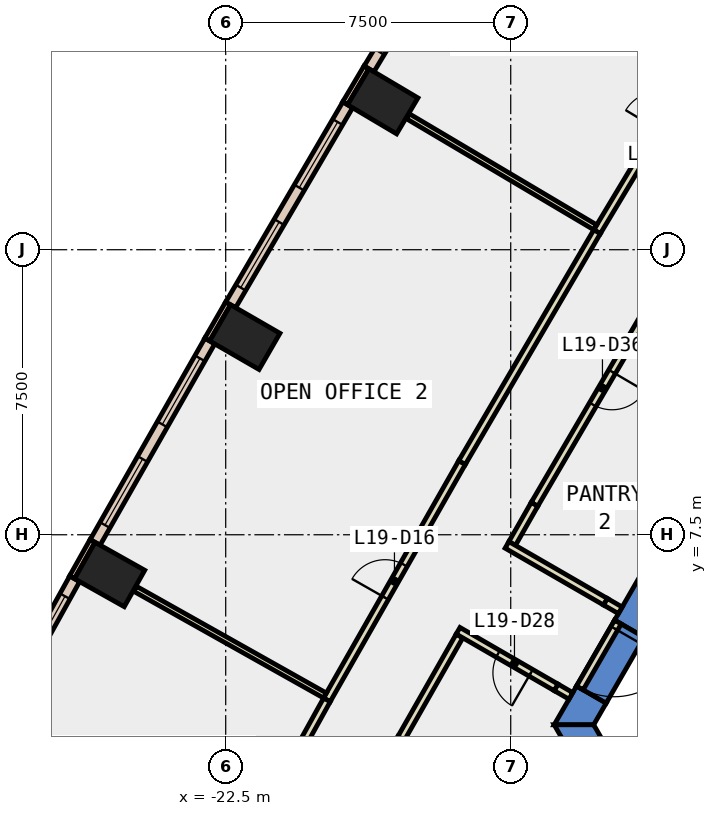
"""IFC4 building model, lengths in metres.
Left out: names, types, materials, properties, quantities, classifications, styles, units other than length and angle.
Written with IfcOpenShell. Run it as: python <this file> out.ifc"""

import sys

from ifc_helpers import new_model, si_unit, direction, frame, frame_2d, origin, origin_2d, place, context, subcontext, project, spatial, polyline, rectangle, outline, extrude, element, fill, save


model = new_model("IFC4")
c1 = context("Model", 3, precision=1e-05, world=origin(), true_north=direction((0.0, 1.0)))
c2 = subcontext(c1, "Body", "Model", "MODEL_VIEW")
j1 = project(units=[si_unit("LENGTHUNIT", "METRE"), si_unit("PLANEANGLEUNIT", "RADIAN")], contexts=[c1])
p1 = place(None, origin())
s1 = spatial("IfcSite", under=j1, at=p1, CompositionType="ELEMENT")
p2 = place(p1, origin())
s2 = spatial("IfcBuilding", under=s1, at=p2, CompositionType="ELEMENT")
p3 = place(p2, frame((0.0, 0.0, 90.8)))
s3 = spatial("IfcBuildingStorey", under=s2, at=p3, CompositionType="ELEMENT", Elevation=90.8)
for number, where, z_axis, x_axis in (
    (1, (-18.367, 18.904, -0.4), (0.0, 0.0, 1.0), (0.51, 0.86, 0.0)),
    (2, (-21.997, 12.7, -0.4), (0.0, 0.0, 1.0), (0.5, 0.866, 0.0)),
    (3, (-25.554, 6.454, -0.4), (0.0, 0.0, 1.0), (0.49, 0.872, 0.0)),
):
    element("IfcColumn", number, at=place(p3, frame(where, z_axis=z_axis, x_axis=x_axis)), inside=s3, PredefinedType="COLUMN", context=c2, shape_type="SweptSolid", body=[
        extrude(rectangle(XDim=1.1, YDim=1.5, at=origin_2d()), origin(), (0.0, 0.0, 1.0), 4.2),
    ])
p4 = place(p3, frame((0.0, 0.0, -0.4)))
e4 = element("IfcWall", 4, at=p4, inside=s3, PredefinedType="SHEAR", context=c2, shape_type="SweptSolid", body=[
    extrude(outline(polyline([(-12.267, 5.252), (-11.488, 4.802), (-6.409, 13.6), (-6.928, 14.5), (-12.267, 5.252)])), origin(), (0.0, 0.0, 1.0), 4.2),
])
p5 = place(p3, frame((0.0, 0.0, -0.4)))
e5 = element("IfcWall", 5, at=p5, inside=s3, PredefinedType="SHEAR", context=c2, shape_type="SweptSolid", body=[
    extrude(outline(polyline([(-12.488, 3.07), (-13.267, 3.52), (-13.856, 2.5), (-12.817, 2.5), (-12.488, 3.07)])), origin(), (0.0, 0.0, 1.0), 4.2),
])
p6 = place(p3, frame((0.0, 0.0, 3.6)))
e6 = element("IfcWall", 6, at=p6, inside=s3, PredefinedType="SHEAR", context=c2, shape_type="SweptSolid", body=[
    extrude(outline(polyline([(-13.267, 3.52), (-12.488, 3.07), (-11.488, 4.802), (-12.267, 5.252), (-13.267, 3.52)])), origin(), (0.0, 0.0, 1.0), 0.2),
])
p7 = place(p3, frame((0.0, 0.0, -0.4)))
e7 = element("IfcWall", 7, at=p7, inside=s3, PredefinedType="SHEAR", context=c2, shape_type="SweptSolid", body=[
    extrude(outline(polyline([(-13.856, 2.5), (-6.928, -9.5), (-6.409, -8.6), (-12.817, 2.5), (-13.856, 2.5)])), origin(), (0.0, 0.0, 1.0), 4.2),
])
p8 = place(p3, frame((-18.796, 19.798, 0.0), z_axis=(0.0, 0.0, 1.0), x_axis=(-0.510082245696, -0.860125631885, 0.0)))
e8 = element("IfcWall", 8, at=p8, inside=s3, PredefinedType="STANDARD", context=c2, shape_type="SweptSolid", body=[
    extrude(rectangle(XDim=1.1, YDim=0.15, at=frame_2d((0.55, 0.0))), origin(), (0.0, 0.0, 1.0), 3.8),
])
p9 = place(p3, frame((-22.436, 13.589, 0.0), z_axis=(0.0, 0.0, 1.0), x_axis=(-0.499837685251, -0.86611909597, 0.0)))
e9 = element("IfcWall", 9, at=p9, inside=s3, PredefinedType="STANDARD", context=c2, shape_type="SweptSolid", body=[
    extrude(rectangle(XDim=1.1, YDim=0.15, at=frame_2d((0.55, 0.0))), origin(), (0.0, 0.0, 1.0), 3.8),
])
p10 = place(p3, frame((-26.004, 7.338, 0.0), z_axis=(0.0, 0.0, 1.0), x_axis=(-0.490008344094, -0.871717742574, 0.0)))
e10 = element("IfcWall", 10, at=p10, inside=s3, PredefinedType="STANDARD", context=c2, shape_type="SweptSolid", body=[
    extrude(rectangle(XDim=1.1, YDim=0.15, at=frame_2d((0.55, 0.0))), origin(), (0.0, 0.0, 1.0), 3.8),
])
p11 = place(p3, frame((-15.588, 24.984, 0.0), z_axis=(0.0, 0.0, 1.0), x_axis=(-0.515102053092, -0.857128855483, 0.0)))
e11 = element("IfcWall", 11, at=p11, inside=s3, PredefinedType="STANDARD", context=c2, shape_type="SweptSolid", body=[
    extrude(rectangle(XDim=6.098, YDim=0.3, at=frame_2d((3.049, 0.0))), origin(), (0.0, 0.0, 1.0), 3.8),
])
p12 = place(p11, frame((0.525, 0.0, 0.9)))
e12 = element("IfcOpeningElement", 12, at=p12, cuts=e11, PredefinedType="OPENING", context=c2, shape_type="SweptSolid", body=[
    extrude(rectangle(XDim=2.0, YDim=2.6, at=frame_2d((1.0, 1.3))), frame((0.0, 0.16, 0.0), z_axis=(0.0, -1.0, 0.0), x_axis=(1.0, 0.0, 0.0)), (0.0, 0.0, 1.0), 0.32),
])
p13 = place(p11, frame((3.574, 0.0, 0.9)))
e13 = element("IfcOpeningElement", 13, at=p13, cuts=e11, PredefinedType="OPENING", context=c2, shape_type="SweptSolid", body=[
    extrude(rectangle(XDim=2.0, YDim=2.6, at=frame_2d((1.0, 1.3))), frame((0.0, 0.16, 0.0), z_axis=(0.0, -1.0, 0.0), x_axis=(1.0, 0.0, 0.0)), (0.0, 0.0, 1.0), 0.32),
])
p14 = place(p3, frame((-19.289, 18.813, 0.0), z_axis=(0.0, 0.0, 1.0), x_axis=(-0.504998117261, -0.863120444413, 0.0)))
e14 = element("IfcWall", 14, at=p14, inside=s3, PredefinedType="STANDARD", context=c2, shape_type="SweptSolid", body=[
    extrude(rectangle(XDim=6.099, YDim=0.3, at=frame_2d((3.049, 0.0))), origin(), (0.0, 0.0, 1.0), 3.8),
])
p15 = place(p14, frame((0.525, 0.0, 0.9)))
e15 = element("IfcOpeningElement", 15, at=p15, cuts=e14, PredefinedType="OPENING", context=c2, shape_type="SweptSolid", body=[
    extrude(rectangle(XDim=2.0, YDim=2.6, at=frame_2d((1.0, 1.3))), frame((0.0, 0.16, 0.0), z_axis=(0.0, -1.0, 0.0), x_axis=(1.0, 0.0, 0.0)), (0.0, 0.0, 1.0), 0.32),
])
p16 = place(p14, frame((3.574, 0.0, 0.9)))
e16 = element("IfcOpeningElement", 16, at=p16, cuts=e14, PredefinedType="OPENING", context=c2, shape_type="SweptSolid", body=[
    extrude(rectangle(XDim=2.0, YDim=2.6, at=frame_2d((1.0, 1.3))), frame((0.0, 0.16, 0.0), z_axis=(0.0, -1.0, 0.0), x_axis=(1.0, 0.0, 0.0)), (0.0, 0.0, 1.0), 0.32),
])
p17 = place(p3, frame((-22.918, 12.598, 0.0), z_axis=(0.0, 0.0, 1.0), x_axis=(-0.49492259535, -0.868937065967, 0.0)))
e17 = element("IfcWall", 17, at=p17, inside=s3, PredefinedType="STANDARD", context=c2, shape_type="SweptSolid", body=[
    extrude(rectangle(XDim=6.098, YDim=0.3, at=frame_2d((3.049, 0.0))), origin(), (0.0, 0.0, 1.0), 3.8),
])
p18 = place(p17, frame((0.525, 0.0, 0.9)))
e18 = element("IfcOpeningElement", 18, at=p18, cuts=e17, PredefinedType="OPENING", context=c2, shape_type="SweptSolid", body=[
    extrude(rectangle(XDim=2.0, YDim=2.6, at=frame_2d((1.0, 1.3))), frame((0.0, 0.16, 0.0), z_axis=(0.0, -1.0, 0.0), x_axis=(1.0, 0.0, 0.0)), (0.0, 0.0, 1.0), 0.32),
])
p19 = place(p17, frame((3.574, 0.0, 0.9)))
e19 = element("IfcOpeningElement", 19, at=p19, cuts=e17, PredefinedType="OPENING", context=c2, shape_type="SweptSolid", body=[
    extrude(rectangle(XDim=2.0, YDim=2.6, at=frame_2d((1.0, 1.3))), frame((0.0, 0.16, 0.0), z_axis=(0.0, -1.0, 0.0), x_axis=(1.0, 0.0, 0.0)), (0.0, 0.0, 1.0), 0.32),
])
p20 = place(p3, frame((-26.474, 6.341, 0.0), z_axis=(0.0, 0.0, 1.0), x_axis=(-0.484823579315, -0.874611969356, 0.0)))
e20 = element("IfcWall", 20, at=p20, inside=s3, PredefinedType="STANDARD", context=c2, shape_type="SweptSolid", body=[
    extrude(rectangle(XDim=6.099, YDim=0.3, at=frame_2d((3.049, 0.0))), origin(), (0.0, 0.0, 1.0), 3.8),
])
p21 = place(p20, frame((0.525, 0.0, 0.9)))
e21 = element("IfcOpeningElement", 21, at=p21, cuts=e20, PredefinedType="OPENING", context=c2, shape_type="SweptSolid", body=[
    extrude(rectangle(XDim=2.0, YDim=2.6, at=frame_2d((1.0, 1.3))), frame((0.0, 0.16, 0.0), z_axis=(0.0, -1.0, 0.0), x_axis=(1.0, 0.0, 0.0)), (0.0, 0.0, 1.0), 0.32),
])
p22 = place(p20, frame((3.574, 0.0, 0.9)))
e22 = element("IfcOpeningElement", 22, at=p22, cuts=e20, PredefinedType="OPENING", context=c2, shape_type="SweptSolid", body=[
    extrude(rectangle(XDim=2.0, YDim=2.6, at=frame_2d((1.0, 1.3))), frame((0.0, 0.16, 0.0), z_axis=(0.0, -1.0, 0.0), x_axis=(1.0, 0.0, 0.0)), (0.0, 0.0, 1.0), 0.32),
])
p23 = place(p3, frame((-10.797, 14.415, 0.0), z_axis=(0.0, 0.0, 1.0), x_axis=(-0.505008297342, -0.863114488128, 0.0)))
e23 = element("IfcWall", 23, at=p23, inside=s3, PredefinedType="PARTITIONING", context=c2, shape_type="SweptSolid", body=[
    extrude(rectangle(XDim=7.085, YDim=0.2, at=frame_2d((3.542, 0.0))), origin(), (0.0, 0.0, 1.0), 3.8),
])
p24 = place(p23, frame((3.043, 0.0, 0.0)))
e24 = element("IfcOpeningElement", 24, at=p24, cuts=e23, PredefinedType="OPENING", context=c2, shape_type="SweptSolid", body=[
    extrude(rectangle(XDim=1.0, YDim=2.1, at=frame_2d((0.5, 1.05))), frame((0.0, 0.11, 0.0), z_axis=(0.0, -1.0, 0.0), x_axis=(1.0, 0.0, 0.0)), (0.0, 0.0, 1.0), 0.22),
])
p25 = place(p3, frame((-14.375, 8.3, 0.0), z_axis=(0.0, 0.0, 1.0), x_axis=(-0.495074026382, -0.868850797549, 0.0)))
e25 = element("IfcWall", 25, at=p25, inside=s3, PredefinedType="PARTITIONING", context=c2, shape_type="SweptSolid", body=[
    extrude(rectangle(XDim=1.186, YDim=0.2, at=frame_2d((0.593, 0.0))), origin(), (0.0, 0.0, 1.0), 3.8),
])
p26 = place(p3, frame((-15.098, 7.233, 0.0), z_axis=(0.0, 0.0, 1.0), x_axis=(0.866101363304, -0.499868411168, 0.0)))
e26 = element("IfcWall", 26, at=p26, inside=s3, PredefinedType="PARTITIONING", context=c2, shape_type="SweptSolid", body=[
    extrude(rectangle(XDim=2.992, YDim=0.2, at=frame_2d((1.496, 0.0))), origin(), (0.0, 0.0, 1.0), 3.8),
])
p27 = place(p3, frame((-13.417, 3.26, 0.0), z_axis=(0.0, 0.0, 1.0), x_axis=(-0.866032067792, 0.499988457423, 0.0)))
e27 = element("IfcWall", 27, at=p27, inside=s3, PredefinedType="PARTITIONING", context=c2, shape_type="SweptSolid", body=[
    extrude(rectangle(XDim=0.45, YDim=0.2, at=frame_2d((0.225, 0.0))), origin(), (0.0, 0.0, 1.0), 2.4),
])
p28 = place(p3, frame((-16.348, 4.837, 0.0), z_axis=(0.0, 0.0, 1.0), x_axis=(-0.495121026513, -0.868824015037, 0.0)))
e28 = element("IfcWall", 28, at=p28, inside=s3, PredefinedType="PARTITIONING", context=c2, shape_type="SweptSolid", body=[
    extrude(rectangle(XDim=3.101, YDim=0.2, at=frame_2d((1.55, 0.0))), origin(), (0.0, 0.0, 1.0), 3.8),
])
p29 = place(p3, frame((-12.728, 15.473, 0.0), z_axis=(0.0, 0.0, 1.0), x_axis=(0.515010673306, 0.857183764651, 0.0)))
e29 = element("IfcWall", 29, at=p29, inside=s3, PredefinedType="PARTITIONING", context=c2, shape_type="SweptSolid", body=[
    extrude(rectangle(XDim=7.111, YDim=0.2, at=frame_2d((3.555, 0.0))), origin(), (0.0, 0.0, 1.0), 3.8),
])
p30 = place(p29, frame((3.13, 0.0, 0.0)))
e30 = element("IfcOpeningElement", 30, at=p30, cuts=e29, PredefinedType="OPENING", context=c2, shape_type="SweptSolid", body=[
    extrude(rectangle(XDim=1.0, YDim=2.1, at=frame_2d((0.5, 1.05))), frame((0.0, 0.11, 0.0), z_axis=(0.0, -1.0, 0.0), x_axis=(1.0, 0.0, 0.0)), (0.0, 0.0, 1.0), 0.22),
])
p31 = place(p3, frame((-19.838, 3.156, 0.0), z_axis=(0.0, 0.0, 1.0), x_axis=(0.494978648769, 0.868905137091, 0.0)))
e31 = element("IfcWall", 31, at=p31, inside=s3, PredefinedType="PARTITIONING", context=c2, shape_type="SweptSolid", body=[
    extrude(rectangle(XDim=7.186, YDim=0.2, at=frame_2d((3.593, 0.0))), origin(), (0.0, 0.0, 1.0), 3.8),
])
p32 = place(p31, frame((3.093, 0.0, 0.0)))
e32 = element("IfcOpeningElement", 32, at=p32, cuts=e31, PredefinedType="OPENING", context=c2, shape_type="SweptSolid", body=[
    extrude(rectangle(XDim=1.0, YDim=2.1, at=frame_2d((0.5, 1.05))), frame((0.0, 0.11, 0.0), z_axis=(0.0, -1.0, 0.0), x_axis=(1.0, 0.0, 0.0)), (0.0, 0.0, 1.0), 0.22),
])
p33 = place(p3, frame((-16.281, 9.4, 0.0), z_axis=(0.0, 0.0, 1.0), x_axis=(0.504973069247, 0.863135099121, 0.0)))
e33 = element("IfcWall", 33, at=p33, inside=s3, PredefinedType="PARTITIONING", context=c2, shape_type="SweptSolid", body=[
    extrude(rectangle(XDim=7.036, YDim=0.2, at=frame_2d((3.518, 0.0))), origin(), (0.0, 0.0, 1.0), 3.8),
])
p34 = place(p3, frame((-23.284, -3.064, 0.0), z_axis=(0.0, 0.0, 1.0), x_axis=(0.48478560119, 0.874633020689, 0.0)))
e34 = element("IfcWall", 34, at=p34, inside=s3, PredefinedType="PARTITIONING", context=c2, shape_type="SweptSolid", body=[
    extrude(rectangle(XDim=7.11, YDim=0.2, at=frame_2d((3.555, 0.0))), origin(), (0.0, 0.0, 1.0), 3.8),
])
p35 = place(p34, frame((3.13, 0.0, 0.0)))
e35 = element("IfcOpeningElement", 35, at=p35, cuts=e34, PredefinedType="OPENING", context=c2, shape_type="SweptSolid", body=[
    extrude(rectangle(XDim=1.0, YDim=2.1, at=frame_2d((0.5, 1.05))), frame((0.0, 0.11, 0.0), z_axis=(0.0, -1.0, 0.0), x_axis=(1.0, 0.0, 0.0)), (0.0, 0.0, 1.0), 0.22),
])
p36 = place(p3, frame((-12.776, 15.589, 0.0), z_axis=(0.0, 0.0, 1.0), x_axis=(-0.860225086153, 0.509914503768, 0.0)))
e36 = element("IfcWall", 36, at=p36, inside=s3, PredefinedType="PARTITIONING", context=c2, shape_type="SweptSolid", body=[
    extrude(rectangle(XDim=5.73, YDim=0.15, at=frame_2d((2.865, 0.0))), origin(), (0.0, 0.0, 1.0), 3.8),
])
p37 = place(p3, frame((-19.888, 3.27, 0.0), z_axis=(0.0, 0.0, 1.0), x_axis=(-0.871789386467, 0.489880868828, 0.0)))
e37 = element("IfcWall", 37, at=p37, inside=s3, PredefinedType="PARTITIONING", context=c2, shape_type="SweptSolid", body=[
    extrude(rectangle(XDim=5.73, YDim=0.15, at=frame_2d((2.865, 0.0))), origin(), (0.0, 0.0, 1.0), 3.8),
])
p38 = place(p3, frame((-12.18, 5.202, 0.0), z_axis=(0.0, 0.0, 1.0), x_axis=(-0.50002537861, -0.866010750942, 0.0)))
e38 = element("IfcWall", 38, at=p38, inside=s3, PredefinedType="PARTITIONING", context=c2, shape_type="SweptSolid", body=[
    extrude(rectangle(XDim=2.0, YDim=0.2, at=frame_2d((1.0, 0.0))), origin(), (0.0, 0.0, 1.0), 2.4),
])
p39 = place(p38, frame((0.19, 0.0, 0.0)))
e39 = element("IfcOpeningElement", 39, at=p39, cuts=e38, PredefinedType="OPENING", context=c2, shape_type="SweptSolid", body=[
    extrude(rectangle(XDim=1.8, YDim=2.1, at=frame_2d((0.9, 1.05))), frame((0.0, 0.11, 0.0), z_axis=(0.0, -1.0, 0.0), x_axis=(1.0, 0.0, 0.0)), (0.0, 0.0, 1.0), 0.22),
])
p40 = place(p3, frame((-12.506, 5.737, 0.0), z_axis=(0.0, 0.0, 1.0), x_axis=(0.865624510465, -0.500693725627, 0.0)))
e40 = element("IfcWall", 40, at=p40, inside=s3, PredefinedType="PARTITIONING", context=c2, shape_type="SweptSolid", body=[
    extrude(rectangle(XDim=0.449, YDim=0.2, at=frame_2d((0.225, 0.0))), origin(), (0.0, 0.0, 1.0), 2.4),
])
p41 = place(p3, frame((-13.807, 3.485, 0.0), z_axis=(0.0, 0.0, 1.0), x_axis=(-0.865947944451, 0.500134139508, 0.0)))
e41 = element("IfcWall", 41, at=p41, inside=s3, PredefinedType="PARTITIONING", context=c2, shape_type="SweptSolid", body=[
    extrude(rectangle(XDim=2.977, YDim=0.2, at=frame_2d((1.489, 0.0))), origin(), (0.0, 0.0, 1.0), 3.8),
])
p42 = place(p41, frame((0.764, 0.0, 0.0)))
e42 = element("IfcOpeningElement", 42, at=p42, cuts=e41, PredefinedType="OPENING", context=c2, shape_type="SweptSolid", body=[
    extrude(rectangle(XDim=1.0, YDim=2.1, at=frame_2d((0.5, 1.05))), frame((0.0, 0.11, 0.0), z_axis=(0.0, -1.0, 0.0), x_axis=(1.0, 0.0, 0.0)), (0.0, 0.0, 1.0), 0.22),
])
p43 = place(p3, frame((-9.788, 2.853, 0.0), z_axis=(0.0, 0.0, 1.0), x_axis=(-0.865998541277, -0.500046524342, 0.0)))
e43 = element("IfcWall", 43, at=p43, inside=s3, PredefinedType="STANDARD", context=c2, shape_type="SweptSolid", body=[
    extrude(rectangle(XDim=2.5, YDim=0.2, at=frame_2d((1.25, 0.0))), origin(), (0.0, 0.0, 1.0), 3.8),
])
p44 = place(p13, origin())
e44 = element("IfcWindow", 44, at=p44, inside=s3, PartitioningType="SINGLE_PANEL", PredefinedType="WINDOW", context=c2, shape_type="SweptSolid", body=[
    extrude(rectangle(XDim=2.0, YDim=2.6, at=frame_2d((1.0, 1.3))), frame((0.0, 0.03, 0.0), z_axis=(0.0, -1.0, 0.0), x_axis=(1.0, 0.0, 0.0)), (0.0, 0.0, 1.0), 0.06),
])
fill(e13, e44)
p45 = place(p15, origin())
e45 = element("IfcWindow", 45, at=p45, inside=s3, PartitioningType="SINGLE_PANEL", PredefinedType="WINDOW", context=c2, shape_type="SweptSolid", body=[
    extrude(rectangle(XDim=2.0, YDim=2.6, at=frame_2d((1.0, 1.3))), frame((0.0, 0.03, 0.0), z_axis=(0.0, -1.0, 0.0), x_axis=(1.0, 0.0, 0.0)), (0.0, 0.0, 1.0), 0.06),
])
fill(e15, e45)
p46 = place(p16, origin())
e46 = element("IfcWindow", 46, at=p46, inside=s3, PartitioningType="SINGLE_PANEL", PredefinedType="WINDOW", context=c2, shape_type="SweptSolid", body=[
    extrude(rectangle(XDim=2.0, YDim=2.6, at=frame_2d((1.0, 1.3))), frame((0.0, 0.03, 0.0), z_axis=(0.0, -1.0, 0.0), x_axis=(1.0, 0.0, 0.0)), (0.0, 0.0, 1.0), 0.06),
])
fill(e16, e46)
p47 = place(p18, origin())
e47 = element("IfcWindow", 47, at=p47, inside=s3, PartitioningType="SINGLE_PANEL", PredefinedType="WINDOW", context=c2, shape_type="SweptSolid", body=[
    extrude(rectangle(XDim=2.0, YDim=2.6, at=frame_2d((1.0, 1.3))), frame((0.0, 0.03, 0.0), z_axis=(0.0, -1.0, 0.0), x_axis=(1.0, 0.0, 0.0)), (0.0, 0.0, 1.0), 0.06),
])
fill(e18, e47)
p48 = place(p19, origin())
e48 = element("IfcWindow", 48, at=p48, inside=s3, PartitioningType="SINGLE_PANEL", PredefinedType="WINDOW", context=c2, shape_type="SweptSolid", body=[
    extrude(rectangle(XDim=2.0, YDim=2.6, at=frame_2d((1.0, 1.3))), frame((0.0, 0.03, 0.0), z_axis=(0.0, -1.0, 0.0), x_axis=(1.0, 0.0, 0.0)), (0.0, 0.0, 1.0), 0.06),
])
fill(e19, e48)
p49 = place(p21, origin())
e49 = element("IfcWindow", 49, at=p49, inside=s3, PartitioningType="SINGLE_PANEL", PredefinedType="WINDOW", context=c2, shape_type="SweptSolid", body=[
    extrude(rectangle(XDim=2.0, YDim=2.6, at=frame_2d((1.0, 1.3))), frame((0.0, 0.03, 0.0), z_axis=(0.0, -1.0, 0.0), x_axis=(1.0, 0.0, 0.0)), (0.0, 0.0, 1.0), 0.06),
])
fill(e21, e49)
p50 = place(p32, origin())
e50 = element("IfcDoor", 50, at=p50, inside=s3, OperationType="SINGLE_SWING_LEFT", PredefinedType="DOOR", context=c2, shape_type="SweptSolid", body=[
    extrude(rectangle(XDim=1.0, YDim=2.1, at=frame_2d((0.5, 1.05))), frame((0.0, 0.025, 0.0), z_axis=(0.0, -1.0, 0.0), x_axis=(1.0, 0.0, 0.0)), (0.0, 0.0, 1.0), 0.05),
])
fill(e32, e50)
p51 = place(p42, origin())
e51 = element("IfcDoor", 51, at=p51, inside=s3, OperationType="SINGLE_SWING_LEFT", PredefinedType="DOOR", context=c2, shape_type="SweptSolid", body=[
    extrude(rectangle(XDim=1.0, YDim=2.1, at=frame_2d((0.5, 1.05))), frame((0.0, 0.025, 0.0), z_axis=(0.0, -1.0, 0.0), x_axis=(1.0, 0.0, 0.0)), (0.0, 0.0, 1.0), 0.05),
])
fill(e42, e51)
p52 = place(p24, origin())
e52 = element("IfcDoor", 52, at=p52, inside=s3, OperationType="SINGLE_SWING_LEFT", PredefinedType="DOOR", context=c2, shape_type="SweptSolid", body=[
    extrude(rectangle(XDim=1.0, YDim=2.1, at=frame_2d((0.5, 1.05))), frame((0.0, 0.025, 0.0), z_axis=(0.0, -1.0, 0.0), x_axis=(1.0, 0.0, 0.0)), (0.0, 0.0, 1.0), 0.05),
])
fill(e24, e52)
p53 = place(p39, origin())
e53 = element("IfcDoor", 53, at=p53, inside=s3, OperationType="DOUBLE_DOOR_SINGLE_SWING", PredefinedType="DOOR", context=c2, shape_type="SweptSolid", body=[
    extrude(rectangle(XDim=1.8, YDim=2.1, at=frame_2d((0.9, 1.05))), frame((0.0, 0.025, 0.0), z_axis=(0.0, -1.0, 0.0), x_axis=(1.0, 0.0, 0.0)), (0.0, 0.0, 1.0), 0.05),
])
fill(e39, e53)
save(model, sys.argv[1])
